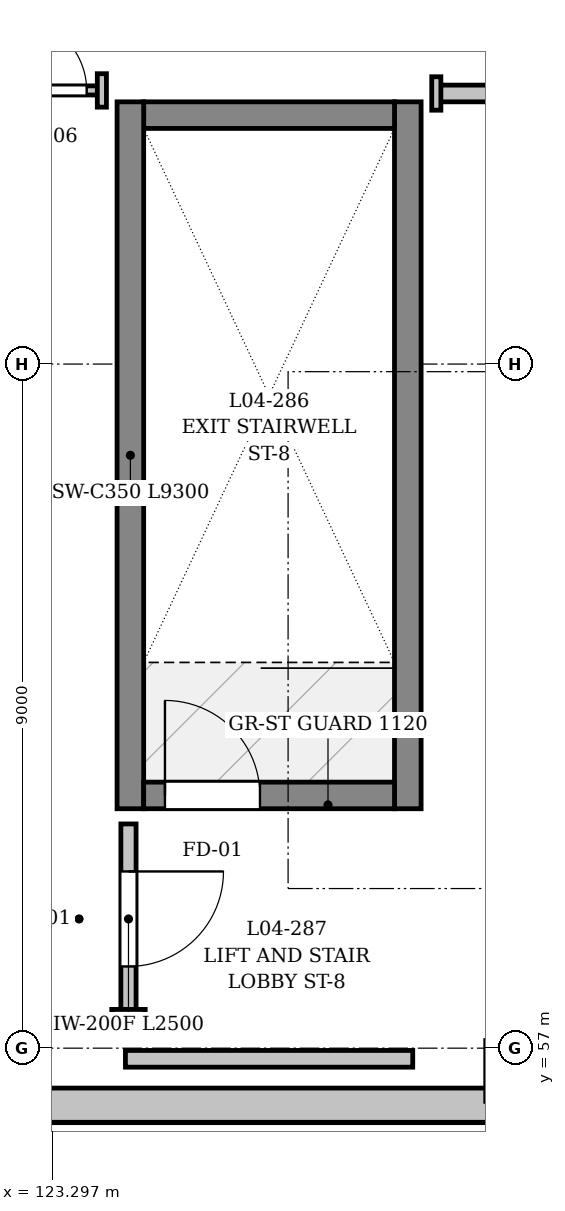
"""IFC4 building model, lengths in metres.
Left out: names, types, materials, properties, quantities, classifications, styles, units other than length and angle.
Written with IfcOpenShell. Run it as: python <this file> out.ifc"""

import sys

from ifc_helpers import new_model, si_unit, direction, frame, frame_2d, origin, origin_2d, place, context, subcontext, project, spatial, rectangle, extrude, element, fill, save


model = new_model("IFC4")
c1 = context("Model", 3, precision=1e-05, world=origin(), true_north=direction((0.0, 1.0)))
c2 = subcontext(c1, "Body", "Model", "MODEL_VIEW")
j1 = project(units=[si_unit("LENGTHUNIT", "METRE"), si_unit("PLANEANGLEUNIT", "RADIAN")], contexts=[c1])
p1 = place(None, origin())
s1 = spatial("IfcSite", under=j1, at=p1, CompositionType="ELEMENT")
p2 = place(p1, origin())
s2 = spatial("IfcBuilding", under=s1, at=p2, CompositionType="ELEMENT")
p3 = place(p2, frame((0.0, 0.0, 15.0)))
s3 = spatial("IfcBuildingStorey", under=s2, at=p3, CompositionType="ELEMENT", Elevation=15.0)
p4 = place(p3, frame((129.4, 56.7, 0.0), z_axis=(0.0, 0.0, 1.0), x_axis=(1.0, 0.0, 0.0)))
e1 = element("IfcColumn", 1, at=p4, inside=s3, PredefinedType="COLUMN", context=c2, shape_type="SweptSolid", body=[
    extrude(rectangle(XDim=0.8, YDim=0.8, at=origin_2d()), origin(), (0.0, 0.0, 1.0), 4.54),
])
p5 = place(p3, frame((144.98, 56.25, 0.0), z_axis=(0.0, 0.0, 1.0), x_axis=(-1.0, 0.0, 0.0)))
e2 = element("IfcWall", 2, at=p5, inside=s3, PredefinedType="SOLIDWALL", context=c2, shape_type="SweptSolid", body=[
    extrude(rectangle(XDim=22.73, YDim=0.45, at=frame_2d((11.365, 0.0))), origin(), (0.0, 0.0, 1.0), 4.54),
])
p6 = place(p5, frame((4.82, 0.0, 0.9)))
e3 = element("IfcOpeningElement", 3, at=p6, cuts=e2, PredefinedType="OPENING", context=c2, shape_type="SweptSolid", body=[
    extrude(rectangle(XDim=1.45, YDim=1.5, at=frame_2d((0.725, 0.75))), frame((0.0, 0.235, 0.0), z_axis=(0.0, -1.0, 0.0), x_axis=(1.0, 0.0, 0.0)), (0.0, 0.0, 1.0), 0.47),
])
p7 = place(p5, frame((8.84, 0.0, 0.9)))
e4 = element("IfcOpeningElement", 4, at=p7, cuts=e2, PredefinedType="OPENING", context=c2, shape_type="SweptSolid", body=[
    extrude(rectangle(XDim=1.45, YDim=1.5, at=frame_2d((0.725, 0.75))), frame((0.0, 0.235, 0.0), z_axis=(0.0, -1.0, 0.0), x_axis=(1.0, 0.0, 0.0)), (0.0, 0.0, 1.0), 0.47),
])
p8 = place(p5, frame((12.44, 0.0, 0.9)))
e5 = element("IfcOpeningElement", 5, at=p8, cuts=e2, PredefinedType="OPENING", context=c2, shape_type="SweptSolid", body=[
    extrude(rectangle(XDim=1.45, YDim=1.5, at=frame_2d((0.725, 0.75))), frame((0.0, 0.235, 0.0), z_axis=(0.0, -1.0, 0.0), x_axis=(1.0, 0.0, 0.0)), (0.0, 0.0, 1.0), 0.47),
])
p9 = place(p3, frame((127.975, 60.15, 0.0), z_axis=(0.0, 0.0, 1.0), x_axis=(0.0, 1.0, 0.0)))
e6 = element("IfcWall", 6, at=p9, inside=s3, PredefinedType="SHEAR", context=c2, shape_type="SweptSolid", body=[
    extrude(rectangle(XDim=9.3, YDim=0.35, at=frame_2d((4.65, 0.0))), origin(), (0.0, 0.0, 1.0), 3.6),
])
p10 = place(p3, frame((127.8, 69.275, 0.0), z_axis=(0.0, 0.0, 1.0), x_axis=(-1.0, 0.0, 0.0)))
e7 = element("IfcWall", 7, at=p10, inside=s3, PredefinedType="SHEAR", context=c2, shape_type="SweptSolid", body=[
    extrude(rectangle(XDim=3.3, YDim=0.35, at=frame_2d((1.65, 0.0))), origin(), (0.0, 0.0, 1.0), 3.6),
])
p11 = place(p3, frame((124.325, 69.45, 0.0), z_axis=(0.0, 0.0, 1.0), x_axis=(0.0, -1.0, 0.0)))
e8 = element("IfcWall", 8, at=p11, inside=s3, PredefinedType="SHEAR", context=c2, shape_type="SweptSolid", body=[
    extrude(rectangle(XDim=9.3, YDim=0.35, at=frame_2d((4.65, 0.0))), origin(), (0.0, 0.0, 1.0), 3.6),
])
p12 = place(p3, frame((124.5, 60.325, 0.0), z_axis=(0.0, 0.0, 1.0), x_axis=(1.0, 0.0, 0.0)))
e9 = element("IfcWall", 9, at=p12, inside=s3, PredefinedType="SHEAR", context=c2, shape_type="SweptSolid", body=[
    extrude(rectangle(XDim=3.3, YDim=0.35, at=frame_2d((1.65, 0.0))), origin(), (0.0, 0.0, 1.0), 3.6),
])
p13 = place(p12, frame((0.28, 0.0, 0.0)))
e10 = element("IfcOpeningElement", 10, at=p13, cuts=e9, PredefinedType="OPENING", context=c2, shape_type="SweptSolid", body=[
    extrude(rectangle(XDim=1.25, YDim=2.2, at=frame_2d((0.625, 1.1))), frame((0.0, 0.185, 0.0), z_axis=(0.0, -1.0, 0.0), x_axis=(1.0, 0.0, 0.0)), (0.0, 0.0, 1.0), 0.37),
])
p14 = place(p3, frame((124.3, 59.95, 0.0), z_axis=(0.0, 0.0, 1.0), x_axis=(0.0, -1.0, 0.0)))
e11 = element("IfcWall", 11, at=p14, inside=s3, PredefinedType="PARTITIONING", context=c2, shape_type="SweptSolid", body=[
    extrude(rectangle(XDim=2.5, YDim=0.2, at=frame_2d((1.25, 0.0))), origin(), (0.0, 0.0, 1.0), 3.55),
])
p15 = place(p14, frame((0.625, 0.0, 0.0)))
e12 = element("IfcOpeningElement", 12, at=p15, cuts=e11, PredefinedType="OPENING", context=c2, shape_type="SweptSolid", body=[
    extrude(rectangle(XDim=1.25, YDim=2.2, at=frame_2d((0.625, 1.1))), frame((0.0, 0.11, 0.0), z_axis=(0.0, -1.0, 0.0), x_axis=(1.0, 0.0, 0.0)), (0.0, 0.0, 1.0), 0.22),
])
p16 = place(p3, frame((122.37, 69.6, 0.0), z_axis=(0.0, 0.0, 1.0), x_axis=(1.0, 0.0, 0.0)))
e13 = element("IfcWall", 13, at=p16, inside=s3, PredefinedType="PARTITIONING", context=c2, shape_type="SweptSolid", body=[
    extrude(rectangle(XDim=1.58, YDim=0.12, at=frame_2d((0.79, 0.0))), origin(), (0.0, 0.0, 1.0), 3.55),
])
p17 = place(p16, frame((0.43, 0.0, 0.0)))
e14 = element("IfcOpeningElement", 14, at=p17, cuts=e13, PredefinedType="OPENING", context=c2, shape_type="SweptSolid", body=[
    extrude(rectangle(XDim=0.95, YDim=2.2, at=frame_2d((0.475, 1.1))), frame((0.0, 0.07, 0.0), z_axis=(0.0, -1.0, 0.0), x_axis=(1.0, 0.0, 0.0)), (0.0, 0.0, 1.0), 0.14),
])
p18 = place(p3, frame((137.92, 69.56, 0.0), z_axis=(0.0, 0.0, 1.0), x_axis=(-1.0, 0.0, 0.0)))
e15 = element("IfcWall", 15, at=p18, inside=s3, PredefinedType="SOLIDWALL", context=c2, shape_type="SweptSolid", body=[
    extrude(rectangle(XDim=9.57, YDim=0.22, at=frame_2d((4.785, 0.0))), origin(), (0.0, 0.0, 1.0), 3.55),
])
p19 = place(p18, frame((4.235, 0.0, 0.0)))
e16 = element("IfcOpeningElement", 16, at=p19, cuts=e15, PredefinedType="OPENING", context=c2, shape_type="SweptSolid", body=[
    extrude(rectangle(XDim=1.1, YDim=2.2, at=frame_2d((0.55, 1.1))), frame((0.0, 0.12, 0.0), z_axis=(0.0, -1.0, 0.0), x_axis=(1.0, 0.0, 0.0)), (0.0, 0.0, 1.0), 0.24),
])
p20 = place(p3, frame((128.04, 56.86, 0.0), z_axis=(0.0, 0.0, 1.0), x_axis=(-1.0, 0.0, 0.0)))
e17 = element("IfcWall", 17, at=p20, inside=s3, PredefinedType="SOLIDWALL", context=c2, shape_type="SweptSolid", body=[
    extrude(rectangle(XDim=3.78, YDim=0.22, at=frame_2d((1.89, 0.0))), origin(), (0.0, 0.0, 1.0), 3.55),
])
p21 = place(p3, frame((124.08, 57.45, 0.0), z_axis=(0.0, 0.0, 1.0), x_axis=(1.0, 0.0, 0.0)))
e18 = element("IfcWall", 18, at=p21, inside=s3, PredefinedType="PARTITIONING", context=c2, shape_type="SweptSolid", body=[
    extrude(rectangle(XDim=0.44, YDim=0.12, at=frame_2d((0.22, 0.0))), origin(), (0.0, 0.0, 1.0), 3.55),
])
p22 = place(p3, frame((123.95, 69.38, 0.0), z_axis=(0.0, 0.0, 1.0), x_axis=(0.0, 1.0, 0.0)))
e19 = element("IfcWall", 19, at=p22, inside=s3, PredefinedType="PARTITIONING", context=c2, shape_type="SweptSolid", body=[
    extrude(rectangle(XDim=0.44, YDim=0.12, at=frame_2d((0.22, 0.0))), origin(), (0.0, 0.0, 1.0), 3.55),
])
p23 = place(p3, frame((128.35, 69.78, 0.0), z_axis=(0.0, 0.0, 1.0), x_axis=(0.0, -1.0, 0.0)))
e20 = element("IfcWall", 20, at=p23, inside=s3, PredefinedType="PARTITIONING", context=c2, shape_type="SweptSolid", body=[
    extrude(rectangle(XDim=0.44, YDim=0.12, at=frame_2d((0.22, 0.0))), origin(), (0.0, 0.0, 1.0), 3.55),
])
p24 = place(p13, origin())
e21 = element("IfcDoor", 21, at=p24, inside=s3, OperationType="SINGLE_SWING_LEFT", PredefinedType="DOOR", context=c2, shape_type="SweptSolid", body=[
    extrude(rectangle(XDim=1.25, YDim=2.2, at=frame_2d((0.625, 1.1))), frame((0.0, 0.025, 0.0), z_axis=(0.0, -1.0, 0.0), x_axis=(1.0, 0.0, 0.0)), (0.0, 0.0, 1.0), 0.05),
])
fill(e10, e21)
p25 = place(p15, origin())
e22 = element("IfcDoor", 22, at=p25, inside=s3, OperationType="SINGLE_SWING_LEFT", PredefinedType="DOOR", context=c2, shape_type="SweptSolid", body=[
    extrude(rectangle(XDim=1.25, YDim=2.2, at=frame_2d((0.625, 1.1))), frame((0.0, 0.025, 0.0), z_axis=(0.0, -1.0, 0.0), x_axis=(1.0, 0.0, 0.0)), (0.0, 0.0, 1.0), 0.05),
])
fill(e12, e22)
p26 = place(p17, origin())
e23 = element("IfcDoor", 23, at=p26, inside=s3, OperationType="SINGLE_SWING_LEFT", PredefinedType="DOOR", context=c2, shape_type="SweptSolid", body=[
    extrude(rectangle(XDim=0.95, YDim=2.2, at=frame_2d((0.475, 1.1))), frame((0.0, 0.025, 0.0), z_axis=(0.0, -1.0, 0.0), x_axis=(1.0, 0.0, 0.0)), (0.0, 0.0, 1.0), 0.05),
])
fill(e14, e23)
save(model, sys.argv[1])
